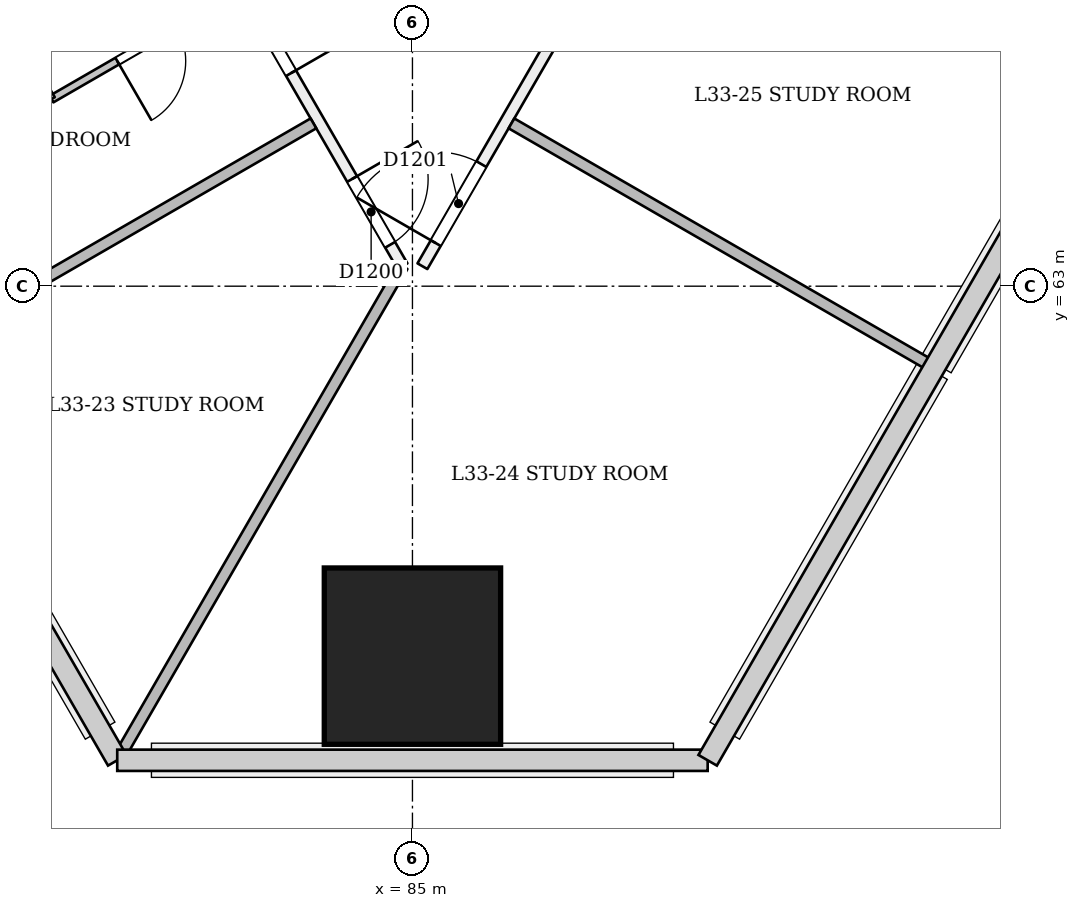
"""IFC4 building model, lengths in metres.
Left out: names, types, materials, properties, quantities, classifications, styles, units other than length and angle.
Written with IfcOpenShell. Run it as: python <this file> out.ifc"""

import sys

from ifc_helpers import new_model, si_unit, direction, frame, frame_2d, origin, origin_2d, place, context, subcontext, project, spatial, rectangle, extrude, element, fill, save


model = new_model("IFC4")
c1 = context("Model", 3, precision=1e-05, world=origin(), true_north=direction((0.0, 1.0)))
c2 = subcontext(c1, "Body", "Model", "MODEL_VIEW")
j1 = project(units=[si_unit("LENGTHUNIT", "METRE"), si_unit("PLANEANGLEUNIT", "RADIAN")], contexts=[c1])
p1 = place(None, origin())
s1 = spatial("IfcSite", under=j1, at=p1, CompositionType="ELEMENT")
p2 = place(p1, origin())
s2 = spatial("IfcBuilding", under=s1, at=p2, CompositionType="ELEMENT")
p3 = place(p2, frame((0.0, 0.0, 131.4)))
s3 = spatial("IfcBuildingStorey", under=s2, at=p3, CompositionType="ELEMENT", Elevation=131.4)
p4 = place(p3, frame((85.0, 58.063, 0.0), z_axis=(0.0, 0.058356907999, 0.998295783467), x_axis=(-1.0, 0.0, 0.0)))
e1 = element("IfcColumn", 1, at=p4, inside=s3, PredefinedType="COLUMN", context=c2, shape_type="SweptSolid", body=[
    extrude(rectangle(XDim=2.32, YDim=2.32, at=origin_2d()), origin(), (0.0, 0.0, 1.0), 3.606),
])
p5 = place(p3, frame((64.656, 98.273, 0.0), z_axis=(0.0, 0.0, 1.0), x_axis=(0.500001784794, -0.866024373331, 0.0)))
e2 = element("IfcWall", 2, at=p5, inside=s3, PredefinedType="PARTITIONING", context=c2, shape_type="SweptSolid", body=[
    extrude(rectangle(XDim=40.426, YDim=0.15, at=frame_2d((20.213, 0.0))), origin(), (0.0, 0.0, 1.0), 2.75),
])
p6 = place(p5, frame((0.2, 0.0, 0.0)))
e3 = element("IfcOpeningElement", 3, at=p6, cuts=e2, PredefinedType="OPENING", context=c2, shape_type="SweptSolid", body=[
    extrude(rectangle(XDim=1.2, YDim=2.1, at=frame_2d((0.6, 1.05))), frame((0.0, 0.085, 0.0), z_axis=(0.0, -1.0, 0.0), x_axis=(1.0, 0.0, 0.0)), (0.0, 0.0, 1.0), 0.171),
])
p7 = place(p5, frame((2.933, 0.0, 0.0)))
e4 = element("IfcOpeningElement", 4, at=p7, cuts=e2, PredefinedType="OPENING", context=c2, shape_type="SweptSolid", body=[
    extrude(rectangle(XDim=1.0, YDim=2.1, at=frame_2d((0.5, 1.05))), frame((0.0, 0.085, 0.0), z_axis=(0.0, -1.0, 0.0), x_axis=(1.0, 0.0, 0.0)), (0.0, 0.0, 1.0), 0.171),
])
p8 = place(p5, frame((9.608, 0.0, 0.0)))
e5 = element("IfcOpeningElement", 5, at=p8, cuts=e2, PredefinedType="OPENING", context=c2, shape_type="SweptSolid", body=[
    extrude(rectangle(XDim=1.0, YDim=2.1, at=frame_2d((0.5, 1.05))), frame((0.0, 0.085, 0.0), z_axis=(0.0, -1.0, 0.0), x_axis=(1.0, 0.0, 0.0)), (0.0, 0.0, 1.0), 0.171),
])
p9 = place(p5, frame((11.818, 0.0, 0.0)))
e6 = element("IfcOpeningElement", 6, at=p9, cuts=e2, PredefinedType="OPENING", context=c2, shape_type="SweptSolid", body=[
    extrude(rectangle(XDim=1.0, YDim=2.1, at=frame_2d((0.5, 1.05))), frame((0.0, 0.085, 0.0), z_axis=(0.0, -1.0, 0.0), x_axis=(1.0, 0.0, 0.0)), (0.0, 0.0, 1.0), 0.171),
])
p10 = place(p5, frame((18.493, 0.0, 0.0)))
e7 = element("IfcOpeningElement", 7, at=p10, cuts=e2, PredefinedType="OPENING", context=c2, shape_type="SweptSolid", body=[
    extrude(rectangle(XDim=1.0, YDim=2.1, at=frame_2d((0.5, 1.05))), frame((0.0, 0.085, 0.0), z_axis=(0.0, -1.0, 0.0), x_axis=(1.0, 0.0, 0.0)), (0.0, 0.0, 1.0), 0.171),
])
p11 = place(p5, frame((21.963, 0.0, 0.0)))
e8 = element("IfcOpeningElement", 8, at=p11, cuts=e2, PredefinedType="OPENING", context=c2, shape_type="SweptSolid", body=[
    extrude(rectangle(XDim=1.0, YDim=2.1, at=frame_2d((0.5, 1.05))), frame((0.0, 0.085, 0.0), z_axis=(0.0, -1.0, 0.0), x_axis=(1.0, 0.0, 0.0)), (0.0, 0.0, 1.0), 0.171),
])
p12 = place(p5, frame((27.493, 0.0, 0.0)))
e9 = element("IfcOpeningElement", 9, at=p12, cuts=e2, PredefinedType="OPENING", context=c2, shape_type="SweptSolid", body=[
    extrude(rectangle(XDim=1.0, YDim=2.1, at=frame_2d((0.5, 1.05))), frame((0.0, 0.085, 0.0), z_axis=(0.0, -1.0, 0.0), x_axis=(1.0, 0.0, 0.0)), (0.0, 0.0, 1.0), 0.171),
])
p13 = place(p5, frame((30.963, 0.0, 0.0)))
e10 = element("IfcOpeningElement", 10, at=p13, cuts=e2, PredefinedType="OPENING", context=c2, shape_type="SweptSolid", body=[
    extrude(rectangle(XDim=1.0, YDim=2.1, at=frame_2d((0.5, 1.05))), frame((0.0, 0.085, 0.0), z_axis=(0.0, -1.0, 0.0), x_axis=(1.0, 0.0, 0.0)), (0.0, 0.0, 1.0), 0.171),
])
p14 = place(p5, frame((36.493, 0.0, 0.0)))
e11 = element("IfcOpeningElement", 11, at=p14, cuts=e2, PredefinedType="OPENING", context=c2, shape_type="SweptSolid", body=[
    extrude(rectangle(XDim=1.0, YDim=2.1, at=frame_2d((0.5, 1.05))), frame((0.0, 0.085, 0.0), z_axis=(0.0, -1.0, 0.0), x_axis=(1.0, 0.0, 0.0)), (0.0, 0.0, 1.0), 0.171),
])
p15 = place(p5, frame((39.101, 0.0, 0.0)))
e12 = element("IfcOpeningElement", 12, at=p15, cuts=e2, PredefinedType="OPENING", context=c2, shape_type="SweptSolid", body=[
    extrude(rectangle(XDim=1.0, YDim=2.1, at=frame_2d((0.5, 1.05))), frame((0.0, 0.085, 0.0), z_axis=(0.0, -1.0, 0.0), x_axis=(1.0, 0.0, 0.0)), (0.0, 0.0, 1.0), 0.171),
])
p16 = place(p3, frame((85.131, 63.263, 0.0), z_axis=(0.0, 0.0, 1.0), x_axis=(0.500002881847, 0.866023739943, 0.0)))
e13 = element("IfcWall", 13, at=p16, inside=s3, PredefinedType="PARTITIONING", context=c2, shape_type="SweptSolid", body=[
    extrude(rectangle(XDim=34.013, YDim=0.15, at=frame_2d((17.006, 0.0))), origin(), (0.0, 0.0, 1.0), 2.75),
])
p17 = place(p16, frame((0.351, 0.0, 0.0)))
e14 = element("IfcOpeningElement", 14, at=p17, cuts=e13, PredefinedType="OPENING", context=c2, shape_type="SweptSolid", body=[
    extrude(rectangle(XDim=1.2, YDim=2.1, at=frame_2d((0.6, 1.05))), frame((0.0, 0.085, 0.0), z_axis=(0.0, -1.0, 0.0), x_axis=(1.0, 0.0, 0.0)), (0.0, 0.0, 1.0), 0.171),
])
p18 = place(p16, frame((3.963, 0.0, 0.0)))
e15 = element("IfcOpeningElement", 15, at=p18, cuts=e13, PredefinedType="OPENING", context=c2, shape_type="SweptSolid", body=[
    extrude(rectangle(XDim=1.0, YDim=2.1, at=frame_2d((0.5, 1.05))), frame((0.0, 0.085, 0.0), z_axis=(0.0, -1.0, 0.0), x_axis=(1.0, 0.0, 0.0)), (0.0, 0.0, 1.0), 0.171),
])
p19 = place(p16, frame((9.493, 0.0, 0.0)))
e16 = element("IfcOpeningElement", 16, at=p19, cuts=e13, PredefinedType="OPENING", context=c2, shape_type="SweptSolid", body=[
    extrude(rectangle(XDim=1.0, YDim=2.1, at=frame_2d((0.5, 1.05))), frame((0.0, 0.085, 0.0), z_axis=(0.0, -1.0, 0.0), x_axis=(1.0, 0.0, 0.0)), (0.0, 0.0, 1.0), 0.171),
])
p20 = place(p16, frame((11.818, 0.0, 0.0)))
e17 = element("IfcOpeningElement", 17, at=p20, cuts=e13, PredefinedType="OPENING", context=c2, shape_type="SweptSolid", body=[
    extrude(rectangle(XDim=1.0, YDim=2.1, at=frame_2d((0.5, 1.05))), frame((0.0, 0.085, 0.0), z_axis=(0.0, -1.0, 0.0), x_axis=(1.0, 0.0, 0.0)), (0.0, 0.0, 1.0), 0.171),
])
p21 = place(p16, frame((18.608, 0.0, 0.0)))
e18 = element("IfcOpeningElement", 18, at=p21, cuts=e13, PredefinedType="OPENING", context=c2, shape_type="SweptSolid", body=[
    extrude(rectangle(XDim=1.0, YDim=2.1, at=frame_2d((0.5, 1.05))), frame((0.0, 0.085, 0.0), z_axis=(0.0, -1.0, 0.0), x_axis=(1.0, 0.0, 0.0)), (0.0, 0.0, 1.0), 0.171),
])
p22 = place(p16, frame((20.933, 0.0, 0.0)))
e19 = element("IfcOpeningElement", 19, at=p22, cuts=e13, PredefinedType="OPENING", context=c2, shape_type="SweptSolid", body=[
    extrude(rectangle(XDim=1.0, YDim=2.1, at=frame_2d((0.5, 1.05))), frame((0.0, 0.085, 0.0), z_axis=(0.0, -1.0, 0.0), x_axis=(1.0, 0.0, 0.0)), (0.0, 0.0, 1.0), 0.171),
])
p23 = place(p16, frame((27.493, 0.0, 0.0)))
e20 = element("IfcOpeningElement", 20, at=p23, cuts=e13, PredefinedType="OPENING", context=c2, shape_type="SweptSolid", body=[
    extrude(rectangle(XDim=1.0, YDim=2.1, at=frame_2d((0.5, 1.05))), frame((0.0, 0.085, 0.0), z_axis=(0.0, -1.0, 0.0), x_axis=(1.0, 0.0, 0.0)), (0.0, 0.0, 1.0), 0.171),
])
p24 = place(p16, frame((29.933, 0.0, 0.0)))
e21 = element("IfcOpeningElement", 21, at=p24, cuts=e13, PredefinedType="OPENING", context=c2, shape_type="SweptSolid", body=[
    extrude(rectangle(XDim=1.0, YDim=2.1, at=frame_2d((0.5, 1.05))), frame((0.0, 0.085, 0.0), z_axis=(0.0, -1.0, 0.0), x_axis=(1.0, 0.0, 0.0)), (0.0, 0.0, 1.0), 0.171),
])
p25 = place(p3, frame((82.697, 66.874, 0.0), z_axis=(0.0, 0.0, 1.0), x_axis=(-0.865989837833, -0.500061596976, 0.0)))
e22 = element("IfcWall", 22, at=p25, inside=s3, PredefinedType="PARTITIONING", context=c2, shape_type="SweptSolid", body=[
    extrude(rectangle(XDim=2.825, YDim=0.1, at=frame_2d((1.413, 0.0))), origin(), (0.0, 0.0, 1.0), 3.15),
])
p26 = place(p25, frame((0.925, 0.0, 0.0)))
e23 = element("IfcOpeningElement", 23, at=p26, cuts=e22, PredefinedType="OPENING", context=c2, shape_type="SweptSolid", body=[
    extrude(rectangle(XDim=0.9, YDim=2.1, at=frame_2d((0.45, 1.05))), frame((0.0, 0.061, 0.0), z_axis=(0.0, -1.0, 0.0), x_axis=(1.0, 0.0, 0.0)), (0.0, 0.0, 1.0), 0.121),
])
p27 = place(p3, frame((80.251, 65.461, 0.0), z_axis=(0.0, 0.0, 1.0), x_axis=(-0.500004234368, 0.866022959057, 0.0)))
e24 = element("IfcWall", 24, at=p27, inside=s3, PredefinedType="PARTITIONING", context=c2, shape_type="SweptSolid", body=[
    extrude(rectangle(XDim=2.5, YDim=0.1, at=frame_2d((1.25, 0.0))), origin(), (0.0, 0.0, 1.0), 2.75),
])
p28 = place(p3, frame((78.202, 61.969, 0.0), z_axis=(0.0, 0.0, 1.0), x_axis=(0.866035020038, 0.499983343791, 0.0)))
e25 = element("IfcWall", 25, at=p28, inside=s3, PredefinedType="PARTITIONING", context=c2, shape_type="SweptSolid", body=[
    extrude(rectangle(XDim=6.345, YDim=0.15, at=frame_2d((3.173, 0.0))), origin(), (0.0, 0.0, 1.0), 2.65),
])
p29 = place(p3, frame((81.159, 56.837, 0.0), z_axis=(0.0, 0.0, 1.0), x_axis=(0.499993047099, 0.866029418006, 0.0)))
e26 = element("IfcWall", 26, at=p29, inside=s3, PredefinedType="PARTITIONING", context=c2, shape_type="SweptSolid", body=[
    extrude(rectangle(XDim=7.419, YDim=0.15, at=frame_2d((3.71, 0.0))), origin(), (0.0, 0.0, 1.0), 2.65),
])
p30 = place(p3, frame((91.798, 61.969, 0.0), z_axis=(0.0, 0.0, 1.0), x_axis=(-0.866025401434, 0.500000004071, 0.0)))
e27 = element("IfcWall", 27, at=p30, inside=s3, PredefinedType="PARTITIONING", context=c2, shape_type="SweptSolid", body=[
    extrude(rectangle(XDim=6.345, YDim=0.15, at=frame_2d((3.173, 0.0))), origin(), (0.0, 0.0, 1.0), 2.65),
])
p31 = place(p3, frame((94.03, 65.876, 0.0), z_axis=(0.0, 0.0, 1.0), x_axis=(-0.866036909293, 0.499980071345, 0.0)))
e28 = element("IfcWall", 28, at=p31, inside=s3, PredefinedType="PARTITIONING", context=c2, shape_type="SweptSolid", body=[
    extrude(rectangle(XDim=3.5, YDim=0.15, at=frame_2d((1.75, 0.0))), origin(), (0.0, 0.0, 1.0), 2.65),
])
p32 = place(p14, origin())
e29 = element("IfcDoor", 29, at=p32, inside=s3, OperationType="SINGLE_SWING_RIGHT", PredefinedType="NOTDEFINED", context=c2, shape_type="SweptSolid", body=[
    extrude(rectangle(XDim=1.0, YDim=2.1, at=frame_2d((0.5, 1.05))), frame((0.0, 0.025, 0.0), z_axis=(0.0, -1.0, 0.0), x_axis=(1.0, 0.0, 0.0)), (0.0, 0.0, 1.0), 0.05),
])
fill(e11, e29)
p33 = place(p26, origin())
e30 = element("IfcDoor", 30, at=p33, inside=s3, OperationType="SINGLE_SWING_RIGHT", PredefinedType="NOTDEFINED", context=c2, shape_type="SweptSolid", body=[
    extrude(rectangle(XDim=0.9, YDim=2.1, at=frame_2d((0.45, 1.05))), frame((0.0, 0.025, 0.0), z_axis=(0.0, -1.0, 0.0), x_axis=(1.0, 0.0, 0.0)), (0.0, 0.0, 1.0), 0.05),
])
fill(e23, e30)
p34 = place(p15, origin())
e31 = element("IfcDoor", 31, at=p34, inside=s3, OperationType="SINGLE_SWING_LEFT", PredefinedType="NOTDEFINED", context=c2, shape_type="SweptSolid", body=[
    extrude(rectangle(XDim=1.0, YDim=2.1, at=frame_2d((0.5, 1.05))), frame((0.0, 0.025, 0.0), z_axis=(0.0, -1.0, 0.0), x_axis=(1.0, 0.0, 0.0)), (0.0, 0.0, 1.0), 0.05),
])
fill(e12, e31)
p35 = place(p17, origin())
e32 = element("IfcDoor", 32, at=p35, inside=s3, OperationType="SINGLE_SWING_LEFT", PredefinedType="NOTDEFINED", context=c2, shape_type="SweptSolid", body=[
    extrude(rectangle(XDim=1.2, YDim=2.1, at=frame_2d((0.6, 1.05))), frame((0.0, 0.025, 0.0), z_axis=(0.0, -1.0, 0.0), x_axis=(1.0, 0.0, 0.0)), (0.0, 0.0, 1.0), 0.05),
])
fill(e14, e32)
save(model, sys.argv[1])
